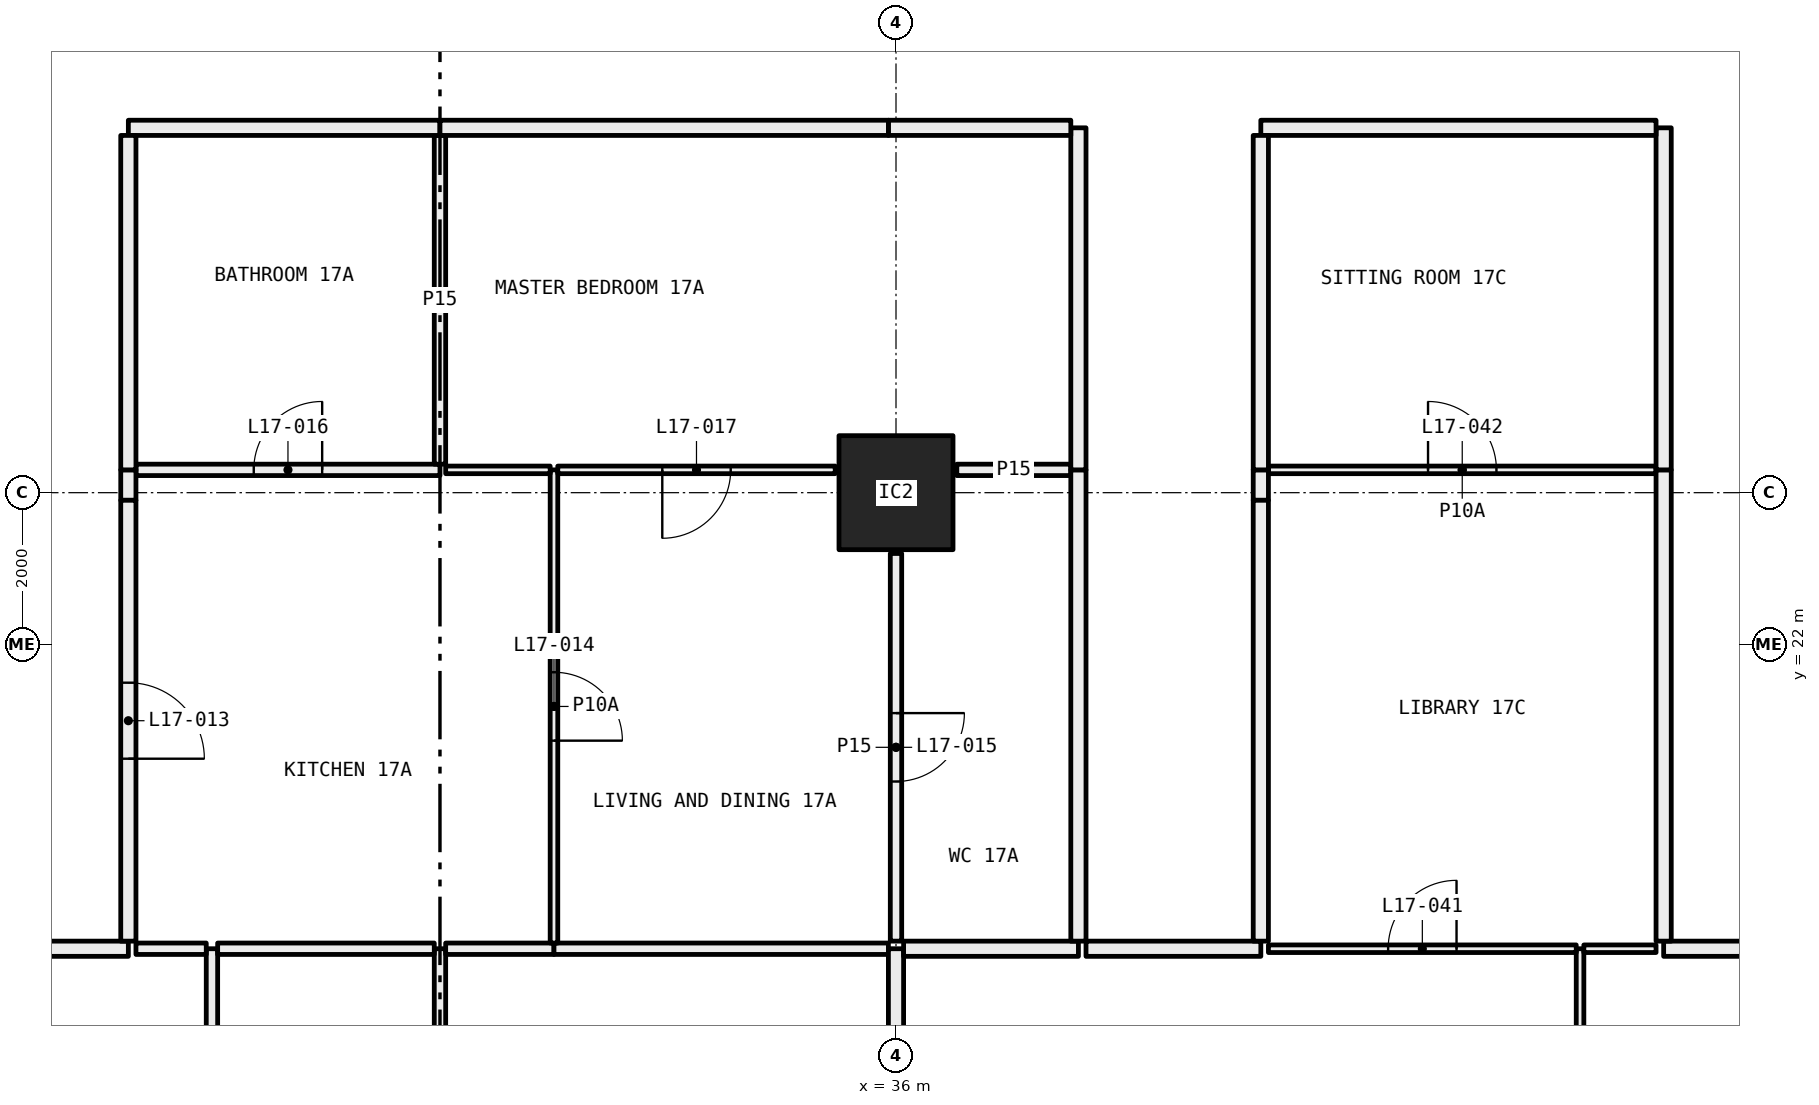
"""IFC4 building model, lengths in metres.
Left out: names, types, materials, properties, quantities, classifications, styles, units other than length and angle.
Written with IfcOpenShell. Run it as: python <this file> out.ifc"""

import sys

from ifc_helpers import new_model, si_unit, direction, frame, frame_2d, origin, origin_2d, place, context, subcontext, project, spatial, rectangle, hollow_rectangle, extrude, element, fill, save


model = new_model("IFC4")
c1 = context("Model", 3, precision=1e-05, world=origin(), true_north=direction((0.0, 1.0)))
c2 = subcontext(c1, "Body", "Model", "MODEL_VIEW")
j1 = project(units=[si_unit("LENGTHUNIT", "METRE"), si_unit("PLANEANGLEUNIT", "RADIAN")], contexts=[c1])
p1 = place(None, origin())
s1 = spatial("IfcSite", under=j1, at=p1, CompositionType="ELEMENT")
p2 = place(p1, origin())
s2 = spatial("IfcBuilding", under=s1, at=p2, CompositionType="ELEMENT")
p3 = place(p2, frame((0.0, 0.0, 71.4)))
s3 = spatial("IfcBuildingStorey", under=s2, at=p3, CompositionType="ELEMENT", Elevation=71.4)
p4 = place(p3, frame((36.0, 24.0, 0.0), z_axis=(0.0, 0.0, 1.0), x_axis=(1.0, 0.0, 0.0)))
e1 = element("IfcColumn", 1, at=p4, inside=s3, PredefinedType="COLUMN", context=c2, shape_type="SweptSolid", body=[
    extrude(hollow_rectangle(XDim=1.5, YDim=1.5, WallThickness=0.065, at=origin_2d()), origin(), (0.0, 0.0, 1.0), 3.05),
])
p5 = place(p3, frame((27.0, 12.075, 0.0), z_axis=(0.0, 0.0, 1.0), x_axis=(0.0, 1.0, 0.0)))
e2 = element("IfcWall", 2, at=p5, inside=s3, PredefinedType="PARTITIONING", context=c2, shape_type="SweptSolid", body=[
    extrude(rectangle(XDim=5.925, YDim=0.15, at=frame_2d((2.962, 0.0))), origin(), (0.0, 0.0, 1.0), 2.45),
])
p6 = place(p3, frame((26.925, 18.0, 0.0), z_axis=(0.0, 0.0, 1.0), x_axis=(-1.0, 0.0, 0.0)))
e3 = element("IfcWall", 3, at=p6, inside=s3, PredefinedType="PARTITIONING", context=c2, shape_type="SweptSolid", body=[
    extrude(rectangle(XDim=0.925, YDim=0.15, at=frame_2d((0.462, 0.0))), origin(), (0.0, 0.0, 1.0), 3.05),
])
p7 = place(p3, frame((25.9, 18.0, 0.0), z_axis=(0.0, 0.0, 1.0), x_axis=(-1.0, 0.0, 0.0)))
e4 = element("IfcWall", 4, at=p7, inside=s3, PredefinedType="PARTITIONING", context=c2, shape_type="SweptSolid", body=[
    extrude(rectangle(XDim=3.4, YDim=0.2, at=frame_2d((1.7, 0.0))), origin(), (0.0, 0.0, 1.0), 3.05),
])
p8 = place(p3, frame((30.0, 12.075, 0.0), z_axis=(0.0, 0.0, 1.0), x_axis=(0.0, 1.0, 0.0)))
e5 = element("IfcWall", 5, at=p8, inside=s3, PredefinedType="PARTITIONING", context=c2, shape_type="SweptSolid", body=[
    extrude(rectangle(XDim=5.925, YDim=0.15, at=frame_2d((2.962, 0.0))), origin(), (0.0, 0.0, 1.0), 2.45),
])
p9 = place(p3, frame((29.925, 18.0, 0.0), z_axis=(0.0, 0.0, 1.0), x_axis=(-1.0, 0.0, 0.0)))
e6 = element("IfcWall", 6, at=p9, inside=s3, PredefinedType="PARTITIONING", context=c2, shape_type="SweptSolid", body=[
    extrude(rectangle(XDim=2.85, YDim=0.15, at=frame_2d((1.425, 0.0))), origin(), (0.0, 0.0, 1.0), 3.05),
])
p10 = place(p3, frame((31.5, 18.0, 0.0), z_axis=(0.0, 0.0, 1.0), x_axis=(-1.0, 0.0, 0.0)))
e7 = element("IfcWall", 7, at=p10, inside=s3, PredefinedType="PARTITIONING", context=c2, shape_type="SweptSolid", body=[
    extrude(rectangle(XDim=1.425, YDim=0.15, at=frame_2d((0.712, 0.0))), origin(), (0.0, 0.0, 1.0), 3.05),
])
p11 = place(p3, frame((35.9, 18.0, 0.0), z_axis=(0.0, 0.0, 1.0), x_axis=(-1.0, 0.0, 0.0)))
e8 = element("IfcWall", 8, at=p11, inside=s3, PredefinedType="PARTITIONING", context=c2, shape_type="SweptSolid", body=[
    extrude(rectangle(XDim=4.4, YDim=0.15, at=frame_2d((2.2, 0.0))), origin(), (0.0, 0.0, 1.0), 3.05),
])
p12 = place(p3, frame((36.0, 12.8, 0.0), z_axis=(0.0, 0.0, 1.0), x_axis=(0.0, 1.0, 0.0)))
e9 = element("IfcWall", 9, at=p12, inside=s3, PredefinedType="PARTITIONING", context=c2, shape_type="SweptSolid", body=[
    extrude(rectangle(XDim=5.2, YDim=0.2, at=frame_2d((2.6, 0.0))), origin(), (0.0, 0.0, 1.0), 2.45),
])
p13 = place(p3, frame((31.5, 18.075, 0.0), z_axis=(0.0, 0.0, 1.0), x_axis=(0.0, 1.0, 0.0)))
e10 = element("IfcWall", 10, at=p13, inside=s3, PredefinedType="PARTITIONING", context=c2, shape_type="SweptSolid", body=[
    extrude(rectangle(XDim=6.225, YDim=0.1, at=frame_2d((3.113, 0.0))), origin(), (0.0, 0.0, 1.0), 2.45),
])
p14 = place(p13, frame((2.663, 0.0, 0.0)))
e11 = element("IfcOpeningElement", 11, at=p14, cuts=e10, PredefinedType="OPENING", context=c2, shape_type="SweptSolid", body=[
    extrude(rectangle(XDim=0.9, YDim=2.1, at=frame_2d((0.45, 1.05))), frame((0.0, 0.06, 0.0), z_axis=(0.0, -1.0, 0.0), x_axis=(1.0, 0.0, 0.0)), (0.0, 0.0, 1.0), 0.12),
])
p15 = place(p3, frame((30.0, 24.3, 0.0), z_axis=(0.0, 0.0, 1.0), x_axis=(-1.0, 0.0, 0.0)))
e12 = element("IfcWall", 12, at=p15, inside=s3, PredefinedType="PARTITIONING", context=c2, shape_type="SweptSolid", body=[
    extrude(rectangle(XDim=4.0, YDim=0.15, at=frame_2d((2.0, 0.0))), origin(), (0.0, 0.0, 1.0), 3.05),
])
p16 = place(p15, frame((1.55, 0.0, 0.0)))
e13 = element("IfcOpeningElement", 13, at=p16, cuts=e12, PredefinedType="OPENING", context=c2, shape_type="SweptSolid", body=[
    extrude(rectangle(XDim=0.9, YDim=2.1, at=frame_2d((0.45, 1.05))), frame((0.0, 0.085, 0.0), z_axis=(0.0, -1.0, 0.0), x_axis=(1.0, 0.0, 0.0)), (0.0, 0.0, 1.0), 0.17),
])
p17 = place(p3, frame((31.45, 24.3, 0.0), z_axis=(0.0, 0.0, 1.0), x_axis=(-1.0, 0.0, 0.0)))
e14 = element("IfcWall", 14, at=p17, inside=s3, PredefinedType="PARTITIONING", context=c2, shape_type="SweptSolid", body=[
    extrude(rectangle(XDim=1.375, YDim=0.1, at=frame_2d((0.688, 0.0))), origin(), (0.0, 0.0, 1.0), 3.05),
])
p18 = place(p3, frame((25.9, 24.3, 0.0), z_axis=(0.0, 0.0, 1.0), x_axis=(0.0, -1.0, 0.0)))
e15 = element("IfcWall", 15, at=p18, inside=s3, PredefinedType="PARTITIONING", context=c2, shape_type="SweptSolid", body=[
    extrude(rectangle(XDim=0.4, YDim=0.2, at=frame_2d((0.2, 0.0))), origin(), (0.0, 0.0, 1.0), 2.45),
])
p19 = place(p3, frame((25.9, 23.9, 0.0), z_axis=(0.0, 0.0, 1.0), x_axis=(0.0, -1.0, 0.0)))
e16 = element("IfcWall", 16, at=p19, inside=s3, PredefinedType="PARTITIONING", context=c2, shape_type="SweptSolid", body=[
    extrude(rectangle(XDim=5.8, YDim=0.2, at=frame_2d((2.9, 0.0))), origin(), (0.0, 0.0, 1.0), 3.05),
])
p20 = place(p19, frame((2.4, 0.0, 0.0)))
e17 = element("IfcOpeningElement", 17, at=p20, cuts=e16, PredefinedType="OPENING", context=c2, shape_type="SweptSolid", body=[
    extrude(rectangle(XDim=1.0, YDim=2.1, at=frame_2d((0.5, 1.05))), frame((0.0, 0.11, 0.0), z_axis=(0.0, -1.0, 0.0), x_axis=(1.0, 0.0, 0.0)), (0.0, 0.0, 1.0), 0.22),
])
p21 = place(p3, frame((36.0, 18.1, 0.0), z_axis=(0.0, 0.0, 1.0), x_axis=(0.0, 1.0, 0.0)))
e18 = element("IfcWall", 18, at=p21, inside=s3, PredefinedType="PARTITIONING", context=c2, shape_type="SweptSolid", body=[
    extrude(rectangle(XDim=5.1, YDim=0.15, at=frame_2d((2.55, 0.0))), origin(), (0.0, 0.0, 1.0), 2.45),
])
p22 = place(p21, frame((2.1, 0.0, 0.0)))
e19 = element("IfcOpeningElement", 19, at=p22, cuts=e18, PredefinedType="OPENING", context=c2, shape_type="SweptSolid", body=[
    extrude(rectangle(XDim=0.9, YDim=2.1, at=frame_2d((0.45, 1.05))), frame((0.0, 0.085, 0.0), z_axis=(0.0, -1.0, 0.0), x_axis=(1.0, 0.0, 0.0)), (0.0, 0.0, 1.0), 0.17),
])
p23 = place(p3, frame((35.2, 24.3, 0.0), z_axis=(0.0, 0.0, 1.0), x_axis=(-1.0, 0.0, 0.0)))
e20 = element("IfcWall", 20, at=p23, inside=s3, PredefinedType="PARTITIONING", context=c2, shape_type="SweptSolid", body=[
    extrude(rectangle(XDim=3.65, YDim=0.1, at=frame_2d((1.825, 0.0))), origin(), (0.0, 0.0, 1.0), 3.05),
])
p24 = place(p23, frame((1.375, 0.0, 0.0)))
e21 = element("IfcOpeningElement", 21, at=p24, cuts=e20, PredefinedType="OPENING", context=c2, shape_type="SweptSolid", body=[
    extrude(rectangle(XDim=0.9, YDim=2.1, at=frame_2d((0.45, 1.05))), frame((0.0, 0.06, 0.0), z_axis=(0.0, -1.0, 0.0), x_axis=(1.0, 0.0, 0.0)), (0.0, 0.0, 1.0), 0.12),
])
p25 = place(p3, frame((38.3, 24.3, 0.0), z_axis=(0.0, 0.0, 1.0), x_axis=(-1.0, 0.0, 0.0)))
e22 = element("IfcWall", 22, at=p25, inside=s3, PredefinedType="PARTITIONING", context=c2, shape_type="SweptSolid", body=[
    extrude(rectangle(XDim=1.5, YDim=0.15, at=frame_2d((0.75, 0.0))), origin(), (0.0, 0.0, 1.0), 3.05),
])
p26 = place(p3, frame((36.1, 18.0, 0.0), z_axis=(0.0, 0.0, 1.0), x_axis=(1.0, 0.0, 0.0)))
e23 = element("IfcWall", 23, at=p26, inside=s3, PredefinedType="PARTITIONING", context=c2, shape_type="SweptSolid", body=[
    extrude(rectangle(XDim=2.3, YDim=0.2, at=frame_2d((1.15, 0.0))), origin(), (0.0, 0.0, 1.0), 3.05),
])
p27 = place(p3, frame((38.4, 18.1, 0.0), z_axis=(0.0, 0.0, 1.0), x_axis=(0.0, 1.0, 0.0)))
e24 = element("IfcWall", 24, at=p27, inside=s3, PredefinedType="PARTITIONING", context=c2, shape_type="SweptSolid", body=[
    extrude(rectangle(XDim=6.2, YDim=0.2, at=frame_2d((3.1, 0.0))), origin(), (0.0, 0.0, 1.0), 2.45),
])
p28 = place(p3, frame((30.0, 24.375, 0.0), z_axis=(0.0, 0.0, 1.0), x_axis=(0.0, 1.0, 0.0)))
e25 = element("IfcWall", 25, at=p28, inside=s3, PredefinedType="PARTITIONING", context=c2, shape_type="SweptSolid", body=[
    extrude(rectangle(XDim=4.325, YDim=0.15, at=frame_2d((2.163, 0.0))), origin(), (0.0, 0.0, 1.0), 3.05),
])
p29 = place(p3, frame((30.0, 28.8, 0.0), z_axis=(0.0, 0.0, 1.0), x_axis=(-1.0, 0.0, 0.0)))
e26 = element("IfcWall", 26, at=p29, inside=s3, PredefinedType="PARTITIONING", context=c2, shape_type="SweptSolid", body=[
    extrude(rectangle(XDim=4.1, YDim=0.2, at=frame_2d((2.05, 0.0))), origin(), (0.0, 0.0, 1.0), 3.05),
])
p30 = place(p3, frame((25.9, 28.7, 0.0), z_axis=(0.0, 0.0, 1.0), x_axis=(0.0, -1.0, 0.0)))
e27 = element("IfcWall", 27, at=p30, inside=s3, PredefinedType="PARTITIONING", context=c2, shape_type="SweptSolid", body=[
    extrude(rectangle(XDim=4.4, YDim=0.2, at=frame_2d((2.2, 0.0))), origin(), (0.0, 0.0, 1.0), 3.05),
])
p31 = place(p3, frame((38.4, 24.3, 0.0), z_axis=(0.0, 0.0, 1.0), x_axis=(0.0, 1.0, 0.0)))
e28 = element("IfcWall", 28, at=p31, inside=s3, PredefinedType="PARTITIONING", context=c2, shape_type="SweptSolid", body=[
    extrude(rectangle(XDim=4.5, YDim=0.2, at=frame_2d((2.25, 0.0))), origin(), (0.0, 0.0, 1.0), 3.05),
])
p32 = place(p3, frame((38.3, 28.8, 0.0), z_axis=(0.0, 0.0, 1.0), x_axis=(-1.0, 0.0, 0.0)))
e29 = element("IfcWall", 29, at=p32, inside=s3, PredefinedType="PARTITIONING", context=c2, shape_type="SweptSolid", body=[
    extrude(rectangle(XDim=2.4, YDim=0.2, at=frame_2d((1.2, 0.0))), origin(), (0.0, 0.0, 1.0), 2.45),
])
p33 = place(p3, frame((35.9, 28.8, 0.0), z_axis=(0.0, 0.0, 1.0), x_axis=(-1.0, 0.0, 0.0)))
e30 = element("IfcWall", 30, at=p33, inside=s3, PredefinedType="PARTITIONING", context=c2, shape_type="SweptSolid", body=[
    extrude(rectangle(XDim=5.9, YDim=0.2, at=frame_2d((2.95, 0.0))), origin(), (0.0, 0.0, 1.0), 3.05),
])
p34 = place(p3, frame((45.0, 12.05, 0.0), z_axis=(0.0, 0.0, 1.0), x_axis=(0.0, 1.0, 0.0)))
e31 = element("IfcWall", 31, at=p34, inside=s3, PredefinedType="PARTITIONING", context=c2, shape_type="SweptSolid", body=[
    extrude(rectangle(XDim=5.95, YDim=0.1, at=frame_2d((2.975, 0.0))), origin(), (0.0, 0.0, 1.0), 2.45),
])
p35 = place(p3, frame((44.95, 18.0, 0.0), z_axis=(0.0, 0.0, 1.0), x_axis=(-1.0, 0.0, 0.0)))
e32 = element("IfcWall", 32, at=p35, inside=s3, PredefinedType="PARTITIONING", context=c2, shape_type="SweptSolid", body=[
    extrude(rectangle(XDim=4.05, YDim=0.1, at=frame_2d((2.025, 0.0))), origin(), (0.0, 0.0, 1.0), 3.05),
])
p36 = place(p35, frame((1.575, 0.0, 0.0)))
e33 = element("IfcOpeningElement", 33, at=p36, cuts=e32, PredefinedType="OPENING", context=c2, shape_type="SweptSolid", body=[
    extrude(rectangle(XDim=0.9, YDim=2.1, at=frame_2d((0.45, 1.05))), frame((0.0, 0.06, 0.0), z_axis=(0.0, -1.0, 0.0), x_axis=(1.0, 0.0, 0.0)), (0.0, 0.0, 1.0), 0.12),
])
p37 = place(p3, frame((40.8, 18.0, 0.0), z_axis=(0.0, 0.0, 1.0), x_axis=(-1.0, 0.0, 0.0)))
e34 = element("IfcWall", 34, at=p37, inside=s3, PredefinedType="PARTITIONING", context=c2, shape_type="SweptSolid", body=[
    extrude(rectangle(XDim=2.3, YDim=0.2, at=frame_2d((1.15, 0.0))), origin(), (0.0, 0.0, 1.0), 3.05),
])
p38 = place(p3, frame((46.0, 18.0, 0.0), z_axis=(0.0, 0.0, 1.0), x_axis=(-1.0, 0.0, 0.0)))
e35 = element("IfcWall", 35, at=p38, inside=s3, PredefinedType="PARTITIONING", context=c2, shape_type="SweptSolid", body=[
    extrude(rectangle(XDim=0.95, YDim=0.1, at=frame_2d((0.475, 0.0))), origin(), (0.0, 0.0, 1.0), 3.05),
])
p39 = place(p3, frame((52.5, 18.0, 0.0), z_axis=(0.0, 0.0, 1.0), x_axis=(-1.0, 0.0, 0.0)))
e36 = element("IfcWall", 36, at=p39, inside=s3, PredefinedType="PARTITIONING", context=c2, shape_type="SweptSolid", body=[
    extrude(rectangle(XDim=6.4, YDim=0.2, at=frame_2d((3.2, 0.0))), origin(), (0.0, 0.0, 1.0), 3.05),
])
p40 = place(p3, frame((46.0, 24.3, 0.0), z_axis=(0.0, 0.0, 1.0), x_axis=(-1.0, 0.0, 0.0)))
e37 = element("IfcWall", 37, at=p40, inside=s3, PredefinedType="PARTITIONING", context=c2, shape_type="SweptSolid", body=[
    extrude(rectangle(XDim=5.1, YDim=0.1, at=frame_2d((2.55, 0.0))), origin(), (0.0, 0.0, 1.0), 3.05),
])
p41 = place(p40, frame((2.1, 0.0, 0.0)))
e38 = element("IfcOpeningElement", 38, at=p41, cuts=e37, PredefinedType="OPENING", context=c2, shape_type="SweptSolid", body=[
    extrude(rectangle(XDim=0.9, YDim=2.1, at=frame_2d((0.45, 1.05))), frame((0.0, 0.06, 0.0), z_axis=(0.0, -1.0, 0.0), x_axis=(1.0, 0.0, 0.0)), (0.0, 0.0, 1.0), 0.12),
])
p42 = place(p3, frame((40.8, 24.3, 0.0), z_axis=(0.0, 0.0, 1.0), x_axis=(0.0, -1.0, 0.0)))
e39 = element("IfcWall", 39, at=p42, inside=s3, PredefinedType="PARTITIONING", context=c2, shape_type="SweptSolid", body=[
    extrude(rectangle(XDim=0.4, YDim=0.2, at=frame_2d((0.2, 0.0))), origin(), (0.0, 0.0, 1.0), 2.45),
])
p43 = place(p3, frame((40.8, 23.9, 0.0), z_axis=(0.0, 0.0, 1.0), x_axis=(0.0, -1.0, 0.0)))
e40 = element("IfcWall", 40, at=p43, inside=s3, PredefinedType="PARTITIONING", context=c2, shape_type="SweptSolid", body=[
    extrude(rectangle(XDim=5.8, YDim=0.2, at=frame_2d((2.9, 0.0))), origin(), (0.0, 0.0, 1.0), 3.05),
])
p44 = place(p3, frame((46.1, 18.1, 0.0), z_axis=(0.0, 0.0, 1.0), x_axis=(0.0, 1.0, 0.0)))
e41 = element("IfcWall", 41, at=p44, inside=s3, PredefinedType="PARTITIONING", context=c2, shape_type="SweptSolid", body=[
    extrude(rectangle(XDim=6.2, YDim=0.2, at=frame_2d((3.1, 0.0))), origin(), (0.0, 0.0, 1.0), 2.45),
])
p45 = place(p3, frame((46.1, 24.3, 0.0), z_axis=(0.0, 0.0, 1.0), x_axis=(0.0, 1.0, 0.0)))
e42 = element("IfcWall", 42, at=p45, inside=s3, PredefinedType="PARTITIONING", context=c2, shape_type="SweptSolid", body=[
    extrude(rectangle(XDim=4.5, YDim=0.2, at=frame_2d((2.25, 0.0))), origin(), (0.0, 0.0, 1.0), 3.05),
])
p46 = place(p3, frame((46.0, 28.8, 0.0), z_axis=(0.0, 0.0, 1.0), x_axis=(-1.0, 0.0, 0.0)))
e43 = element("IfcWall", 43, at=p46, inside=s3, PredefinedType="PARTITIONING", context=c2, shape_type="SweptSolid", body=[
    extrude(rectangle(XDim=5.2, YDim=0.2, at=frame_2d((2.6, 0.0))), origin(), (0.0, 0.0, 1.0), 3.05),
])
p47 = place(p3, frame((40.8, 28.7, 0.0), z_axis=(0.0, 0.0, 1.0), x_axis=(0.0, -1.0, 0.0)))
e44 = element("IfcWall", 44, at=p47, inside=s3, PredefinedType="PARTITIONING", context=c2, shape_type="SweptSolid", body=[
    extrude(rectangle(XDim=4.4, YDim=0.2, at=frame_2d((2.2, 0.0))), origin(), (0.0, 0.0, 1.0), 3.05),
])
p48 = place(p20, origin())
e45 = element("IfcDoor", 45, at=p48, inside=s3, OperationType="SINGLE_SWING_LEFT", PredefinedType="DOOR", context=c2, shape_type="SweptSolid", body=[
    extrude(rectangle(XDim=1.0, YDim=2.1, at=frame_2d((0.5, 1.05))), frame((0.0, 0.025, 0.0), z_axis=(0.0, -1.0, 0.0), x_axis=(1.0, 0.0, 0.0)), (0.0, 0.0, 1.0), 0.05),
])
fill(e17, e45)
p49 = place(p14, frame((0.9, 0.0, 0.0), x_axis=(-1.0, 0.0, 0.0)))
e46 = element("IfcDoor", 46, at=p49, inside=s3, OperationType="SINGLE_SWING_LEFT", PredefinedType="DOOR", context=c2, shape_type="SweptSolid", body=[
    extrude(rectangle(XDim=0.9, YDim=2.1, at=frame_2d((0.45, 1.05))), frame((0.0, 0.025, 0.0), z_axis=(0.0, -1.0, 0.0), x_axis=(1.0, 0.0, 0.0)), (0.0, 0.0, 1.0), 0.05),
])
fill(e11, e46)
p50 = place(p22, frame((0.9, 0.0, 0.0), x_axis=(-1.0, 0.0, 0.0)))
e47 = element("IfcDoor", 47, at=p50, inside=s3, OperationType="SINGLE_SWING_RIGHT", PredefinedType="DOOR", context=c2, shape_type="SweptSolid", body=[
    extrude(rectangle(XDim=0.9, YDim=2.1, at=frame_2d((0.45, 1.05))), frame((0.0, 0.025, 0.0), z_axis=(0.0, -1.0, 0.0), x_axis=(1.0, 0.0, 0.0)), (0.0, 0.0, 1.0), 0.05),
])
fill(e19, e47)
p51 = place(p16, frame((0.9, 0.0, 0.0), x_axis=(-1.0, 0.0, 0.0)))
e48 = element("IfcDoor", 48, at=p51, inside=s3, OperationType="SINGLE_SWING_LEFT", PredefinedType="DOOR", context=c2, shape_type="SweptSolid", body=[
    extrude(rectangle(XDim=0.9, YDim=2.1, at=frame_2d((0.45, 1.05))), frame((0.0, 0.025, 0.0), z_axis=(0.0, -1.0, 0.0), x_axis=(1.0, 0.0, 0.0)), (0.0, 0.0, 1.0), 0.05),
])
fill(e13, e48)
p52 = place(p24, origin())
e49 = element("IfcDoor", 49, at=p52, inside=s3, OperationType="SINGLE_SWING_LEFT", PredefinedType="DOOR", context=c2, shape_type="SweptSolid", body=[
    extrude(rectangle(XDim=0.9, YDim=2.1, at=frame_2d((0.45, 1.05))), frame((0.0, 0.025, 0.0), z_axis=(0.0, -1.0, 0.0), x_axis=(1.0, 0.0, 0.0)), (0.0, 0.0, 1.0), 0.05),
])
fill(e21, e49)
p53 = place(p36, frame((0.9, 0.0, 0.0), x_axis=(-1.0, 0.0, 0.0)))
e50 = element("IfcDoor", 50, at=p53, inside=s3, OperationType="SINGLE_SWING_LEFT", PredefinedType="DOOR", context=c2, shape_type="SweptSolid", body=[
    extrude(rectangle(XDim=0.9, YDim=2.1, at=frame_2d((0.45, 1.05))), frame((0.0, 0.025, 0.0), z_axis=(0.0, -1.0, 0.0), x_axis=(1.0, 0.0, 0.0)), (0.0, 0.0, 1.0), 0.05),
])
fill(e33, e50)
p54 = place(p41, frame((0.9, 0.0, 0.0), x_axis=(-1.0, 0.0, 0.0)))
e51 = element("IfcDoor", 51, at=p54, inside=s3, OperationType="SINGLE_SWING_RIGHT", PredefinedType="DOOR", context=c2, shape_type="SweptSolid", body=[
    extrude(rectangle(XDim=0.9, YDim=2.1, at=frame_2d((0.45, 1.05))), frame((0.0, 0.025, 0.0), z_axis=(0.0, -1.0, 0.0), x_axis=(1.0, 0.0, 0.0)), (0.0, 0.0, 1.0), 0.05),
])
fill(e38, e51)
save(model, sys.argv[1])
